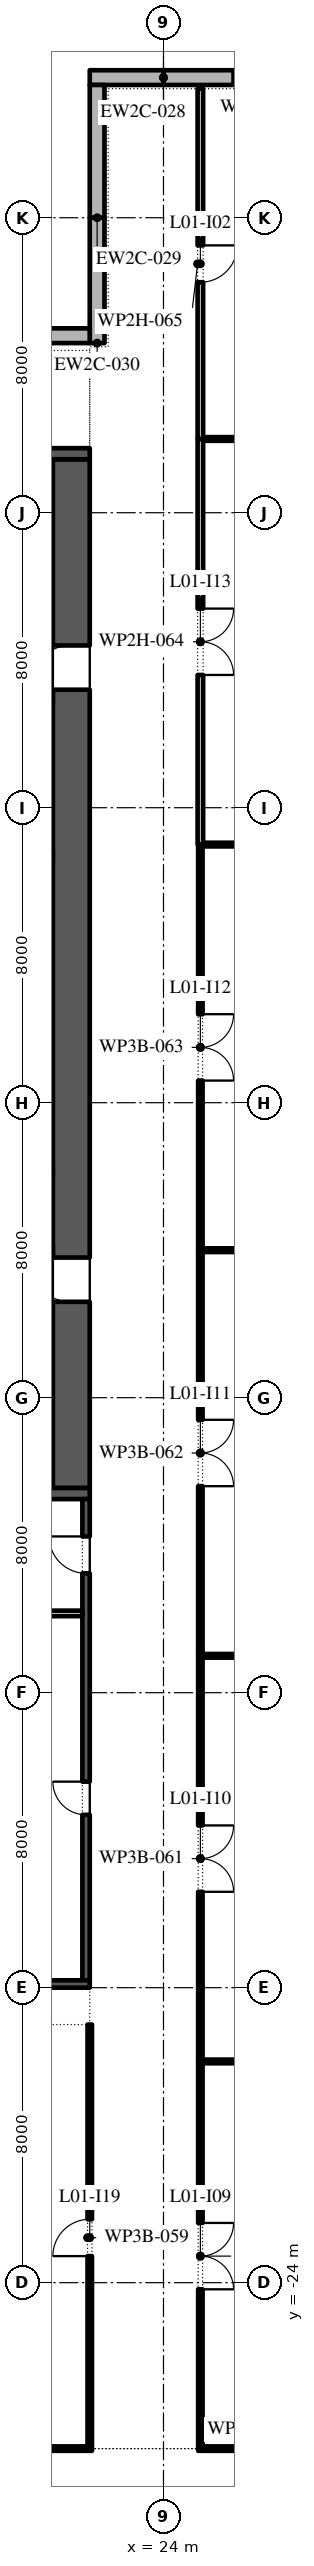
"""IFC4 building model, lengths in metres.
Left out: names, types, materials, properties, quantities, classifications, styles, units other than length and angle.
Written with IfcOpenShell. Run it as: python <this file> out.ifc"""

import sys

from ifc_helpers import new_model, si_unit, direction, frame, frame_2d, origin, place, context, subcontext, project, spatial, polyline, rectangle, outline, extrude, element, fill, save


model = new_model("IFC4")
c1 = context("Model", 3, precision=1e-05, world=origin(), true_north=direction((0.0, 1.0)))
c2 = subcontext(c1, "Body", "Model", "MODEL_VIEW")
j1 = project(units=[si_unit("LENGTHUNIT", "METRE"), si_unit("PLANEANGLEUNIT", "RADIAN")], contexts=[c1])
p1 = place(None, origin())
s1 = spatial("IfcSite", under=j1, at=p1, CompositionType="ELEMENT")
p2 = place(p1, origin())
s2 = spatial("IfcBuilding", under=s1, at=p2, CompositionType="ELEMENT")
p3 = place(p2, frame((0.0, 0.0, 8.0)))
s3 = spatial("IfcBuildingStorey", under=s2, at=p3, CompositionType="ELEMENT", Elevation=8.0)
p4 = place(p3, frame((32.0, 35.8, 0.0), z_axis=(0.0, 0.0, 1.0), x_axis=(-1.0, 0.0, 0.0)))
e1 = element("IfcWall", 1, at=p4, inside=s3, PredefinedType="STANDARD", context=c2, shape_type="SweptSolid", body=[
    extrude(rectangle(XDim=8.0, YDim=0.4, at=frame_2d((4.0, 0.0))), origin(), (0.0, 0.0, 1.0), 5.7),
])
p5 = place(p4, frame((1.9, 0.0, 0.9)))
e2 = element("IfcOpeningElement", 2, at=p5, cuts=e1, PredefinedType="OPENING", context=c2, shape_type="SweptSolid", body=[
    extrude(outline(polyline([(0.0, 0.0), (1.8, 0.0), (1.8, 2.641), (1.785, 2.876), (1.739, 3.107), (1.663, 3.33), (1.559, 3.541), (1.428, 3.737), (1.273, 3.914), (1.096, 4.069), (0.9, 4.2), (0.704, 4.069), (0.527, 3.914), (0.372, 3.737), (0.241, 3.541), (0.137, 3.33), (0.061, 3.107), (0.015, 2.876), (0.0, 2.641), (0.0, 0.0)])), frame((0.0, 0.21, 0.0), z_axis=(0.0, -1.0, 0.0), x_axis=(1.0, 0.0, 0.0)), (0.0, 0.0, 1.0), 0.42),
])
p6 = place(p4, frame((4.3, 0.0, 0.9)))
e3 = element("IfcOpeningElement", 3, at=p6, cuts=e1, PredefinedType="OPENING", context=c2, shape_type="SweptSolid", body=[
    extrude(outline(polyline([(0.0, 0.0), (1.8, 0.0), (1.8, 2.641), (1.785, 2.876), (1.739, 3.107), (1.663, 3.33), (1.559, 3.541), (1.428, 3.737), (1.273, 3.914), (1.096, 4.069), (0.9, 4.2), (0.704, 4.069), (0.527, 3.914), (0.372, 3.737), (0.241, 3.541), (0.137, 3.33), (0.061, 3.107), (0.015, 2.876), (0.0, 2.641), (0.0, 0.0)])), frame((0.0, 0.21, 0.0), z_axis=(0.0, -1.0, 0.0), x_axis=(1.0, 0.0, 0.0)), (0.0, 0.0, 1.0), 0.42),
])
p7 = place(p3, frame((24.0, 35.8, 0.0), z_axis=(0.0, 0.0, 1.0), x_axis=(-1.0, 0.0, 0.0)))
e4 = element("IfcWall", 4, at=p7, inside=s3, PredefinedType="STANDARD", context=c2, shape_type="SweptSolid", body=[
    extrude(rectangle(XDim=2.0, YDim=0.4, at=frame_2d((1.0, 0.0))), origin(), (0.0, 0.0, 1.0), 5.7),
])
p8 = place(p3, frame((22.2, 35.6, 0.0), z_axis=(0.0, 0.0, 1.0), x_axis=(0.0, -1.0, 0.0)))
e5 = element("IfcWall", 5, at=p8, inside=s3, PredefinedType="STANDARD", context=c2, shape_type="SweptSolid", body=[
    extrude(rectangle(XDim=3.6, YDim=0.4, at=frame_2d((1.8, 0.0))), origin(), (0.0, 0.0, 1.0), 5.7),
])
p9 = place(p3, frame((22.2, 32.0, 0.0), z_axis=(0.0, 0.0, 1.0), x_axis=(0.0, -1.0, 0.0)))
e6 = element("IfcWall", 6, at=p9, inside=s3, PredefinedType="STANDARD", context=c2, shape_type="SweptSolid", body=[
    extrude(rectangle(XDim=3.4, YDim=0.4, at=frame_2d((1.7, 0.0))), origin(), (0.0, 0.0, 1.0), 5.7),
])
p10 = place(p3, frame((22.0, 28.8, 0.0), z_axis=(0.0, 0.0, 1.0), x_axis=(-1.0, 0.0, 0.0)))
e7 = element("IfcWall", 7, at=p10, inside=s3, PredefinedType="STANDARD", context=c2, shape_type="SweptSolid", body=[
    extrude(rectangle(XDim=6.0, YDim=0.4, at=frame_2d((3.0, 0.0))), origin(), (0.0, 0.0, 1.0), 5.7),
])
p11 = place(p3, frame((21.5, -2.45, 0.0), z_axis=(0.0, 0.0, 1.0), x_axis=(0.0, 1.0, 0.0)))
e8 = element("IfcWall", 8, at=p11, inside=s3, PredefinedType="SHEAR", context=c2, shape_type="SweptSolid", body=[
    extrude(rectangle(XDim=27.9, YDim=1.0, at=frame_2d((13.95, 0.0))), origin(), (0.0, 0.0, 1.0), 5.7),
])
p12 = place(p11, frame((5.05, 0.0, 0.0)))
e9 = element("IfcOpeningElement", 9, at=p12, cuts=e8, PredefinedType="OPENING", context=c2, shape_type="SweptSolid", body=[
    extrude(rectangle(XDim=1.2, YDim=2.1, at=frame_2d((0.6, 1.05))), frame((0.0, 0.51, 0.0), z_axis=(0.0, -1.0, 0.0), x_axis=(1.0, 0.0, 0.0)), (0.0, 0.0, 1.0), 1.02),
])
p13 = place(p11, frame((21.65, 0.0, 0.0)))
e10 = element("IfcOpeningElement", 10, at=p13, cuts=e8, PredefinedType="OPENING", context=c2, shape_type="SweptSolid", body=[
    extrude(rectangle(XDim=1.2, YDim=2.1, at=frame_2d((0.6, 1.05))), frame((0.0, 0.51, 0.0), z_axis=(0.0, -1.0, 0.0), x_axis=(1.0, 0.0, 0.0)), (0.0, 0.0, 1.0), 1.02),
])
for number, where, z_axis, x_axis in (
    (11, (10.0, -2.6, 0.0), (0.0, 0.0, 1.0), (1.0, 0.0, 0.0)),
    (12, (10.0, 25.6, 0.0), (0.0, 0.0, 1.0), (1.0, 0.0, 0.0)),
):
    element("IfcWall", number, at=place(p3, frame(where, z_axis=z_axis, x_axis=x_axis)), inside=s3, PredefinedType="SHEAR", context=c2, shape_type="SweptSolid", body=[
        extrude(rectangle(XDim=12.0, YDim=0.3, at=frame_2d((6.0, 0.0))), origin(), (0.0, 0.0, 1.0), 5.7),
    ])
for number, where, z_axis, x_axis in (
    (13, (17.3, 4.0, 0.0), (0.0, 0.0, 1.0), (1.0, 0.0, 0.0)),
    (14, (17.3, 19.0, 0.0), (0.0, 0.0, 1.0), (1.0, 0.0, 0.0)),
):
    element("IfcWall", number, at=place(p3, frame(where, z_axis=z_axis, x_axis=x_axis)), inside=s3, PredefinedType="SHEAR", context=c2, shape_type="SweptSolid", body=[
        extrude(rectangle(XDim=3.7, YDim=0.3, at=frame_2d((1.85, 0.0))), origin(), (0.0, 0.0, 1.0), 5.7),
    ])
p14 = place(p3, frame((21.9, -15.8, 0.0), z_axis=(0.0, 0.0, 1.0), x_axis=(0.0, 1.0, 0.0)))
e15 = element("IfcWall", 15, at=p14, inside=s3, PredefinedType="SHEAR", context=c2, shape_type="SweptSolid", body=[
    extrude(rectangle(XDim=13.05, YDim=0.2, at=frame_2d((6.525, 0.0))), origin(), (0.0, 0.0, 1.0), 5.7),
])
p15 = place(p14, frame((4.488, 0.0, 0.0)))
e16 = element("IfcOpeningElement", 16, at=p15, cuts=e15, PredefinedType="OPENING", context=c2, shape_type="SweptSolid", body=[
    extrude(rectangle(XDim=0.9, YDim=2.1, at=frame_2d((0.45, 1.05))), frame((0.0, 0.11, 0.0), z_axis=(0.0, -1.0, 0.0), x_axis=(1.0, 0.0, 0.0)), (0.0, 0.0, 1.0), 0.22),
])
p16 = place(p14, frame((11.038, 0.0, 0.0)))
e17 = element("IfcOpeningElement", 17, at=p16, cuts=e15, PredefinedType="OPENING", context=c2, shape_type="SweptSolid", body=[
    extrude(rectangle(XDim=1.0, YDim=2.1, at=frame_2d((0.5, 1.05))), frame((0.0, 0.11, 0.0), z_axis=(0.0, -1.0, 0.0), x_axis=(1.0, 0.0, 0.0)), (0.0, 0.0, 1.0), 0.22),
])
p17 = place(p3, frame((10.0, -15.9, 0.0), z_axis=(0.0, 0.0, 1.0), x_axis=(1.0, 0.0, 0.0)))
e18 = element("IfcWall", 18, at=p17, inside=s3, PredefinedType="SHEAR", context=c2, shape_type="SweptSolid", body=[
    extrude(rectangle(XDim=12.0, YDim=0.2, at=frame_2d((6.0, 0.0))), origin(), (0.0, 0.0, 1.0), 5.7),
])
p18 = place(p3, frame((16.075, -5.85, 0.0), z_axis=(0.0, 0.0, 1.0), x_axis=(1.0, 0.0, 0.0)))
e19 = element("IfcWall", 19, at=p18, inside=s3, PredefinedType="PARTITIONING", context=c2, shape_type="SweptSolid", body=[
    extrude(rectangle(XDim=5.725, YDim=0.15, at=frame_2d((2.863, 0.0))), origin(), (0.0, 0.0, 1.0), 5.7),
])
p19 = place(p3, frame((10.4, -28.5, 0.0), z_axis=(0.0, 0.0, 1.0), x_axis=(1.0, 0.0, 0.0)))
e20 = element("IfcWall", 20, at=p19, inside=s3, PredefinedType="PARTITIONING", context=c2, shape_type="SweptSolid", body=[
    extrude(rectangle(XDim=11.54, YDim=0.12, at=frame_2d((5.77, 0.0))), origin(), (0.0, 0.0, 1.0), 5.7),
])
p20 = place(p3, frame((25.06, -28.5, 0.0), z_axis=(0.0, 0.0, 1.0), x_axis=(1.0, 0.0, 0.0)))
e21 = element("IfcWall", 21, at=p20, inside=s3, PredefinedType="PARTITIONING", context=c2, shape_type="SweptSolid", body=[
    extrude(rectangle(XDim=1.94, YDim=0.12, at=frame_2d((0.97, 0.0))), origin(), (0.0, 0.0, 1.0), 5.7),
])
for number, where, z_axis, x_axis in (
    (22, (25.06, -18.0, 0.0), (0.0, 0.0, 1.0), (1.0, 0.0, 0.0)),
    (23, (25.06, -7.0, 0.0), (0.0, 0.0, 1.0), (1.0, 0.0, 0.0)),
):
    element("IfcWall", number, at=place(p3, frame(where, z_axis=z_axis, x_axis=x_axis)), inside=s3, PredefinedType="PARTITIONING", context=c2, shape_type="SweptSolid", body=[
        extrude(rectangle(XDim=18.44, YDim=0.1, at=frame_2d((9.22, 0.0))), origin(), (0.0, 0.0, 1.0), 5.7),
    ])
p21 = place(p3, frame((25.06, 4.0, 0.0), z_axis=(0.0, 0.0, 1.0), x_axis=(1.0, 0.0, 0.0)))
e24 = element("IfcWall", 24, at=p21, inside=s3, PredefinedType="PARTITIONING", context=c2, shape_type="SweptSolid", body=[
    extrude(rectangle(XDim=6.64, YDim=0.1, at=frame_2d((3.32, 0.0))), origin(), (0.0, 0.0, 1.0), 5.164),
])
p22 = place(p3, frame((25.075, 15.0, 0.0), z_axis=(0.0, 0.0, 1.0), x_axis=(1.0, 0.0, 0.0)))
e25 = element("IfcWall", 25, at=p22, inside=s3, PredefinedType="PARTITIONING", context=c2, shape_type="SweptSolid", body=[
    extrude(rectangle(XDim=16.425, YDim=0.1, at=frame_2d((8.212, 0.0))), origin(), (0.0, 0.0, 1.0), 5.7),
])
p23 = place(p3, frame((25.075, 26.0, 0.0), z_axis=(0.0, 0.0, 1.0), x_axis=(1.0, 0.0, 0.0)))
e26 = element("IfcWall", 26, at=p23, inside=s3, PredefinedType="PARTITIONING", context=c2, shape_type="SweptSolid", body=[
    extrude(rectangle(XDim=8.925, YDim=0.1, at=frame_2d((4.462, 0.0))), origin(), (0.0, 0.0, 1.0), 5.7),
])
p24 = place(p3, frame((22.0, -28.56, 0.0), z_axis=(0.0, 0.0, 1.0), x_axis=(0.0, 1.0, 0.0)))
e27 = element("IfcWall", 27, at=p24, inside=s3, PredefinedType="PARTITIONING", context=c2, shape_type="SweptSolid", body=[
    extrude(rectangle(XDim=11.56, YDim=0.12, at=frame_2d((5.78, 0.0))), origin(), (0.0, 0.0, 1.0), 5.7),
])
p25 = place(p24, frame((5.28, 0.0, 0.0)))
e28 = element("IfcOpeningElement", 28, at=p25, cuts=e27, PredefinedType="OPENING", context=c2, shape_type="SweptSolid", body=[
    extrude(rectangle(XDim=1.0, YDim=2.1, at=frame_2d((0.5, 1.05))), frame((0.0, 0.07, 0.0), z_axis=(0.0, -1.0, 0.0), x_axis=(1.0, 0.0, 0.0)), (0.0, 0.0, 1.0), 0.14),
])
p26 = place(p3, frame((25.0, -28.56, 0.0), z_axis=(0.0, 0.0, 1.0), x_axis=(0.0, 1.0, 0.0)))
e29 = element("IfcWall", 29, at=p26, inside=s3, PredefinedType="PARTITIONING", context=c2, shape_type="SweptSolid", body=[
    extrude(rectangle(XDim=10.56, YDim=0.12, at=frame_2d((5.28, 0.0))), origin(), (0.0, 0.0, 1.0), 5.7),
])
p27 = place(p26, frame((4.38, 0.0, 0.0)))
e30 = element("IfcOpeningElement", 30, at=p27, cuts=e29, PredefinedType="OPENING", context=c2, shape_type="SweptSolid", body=[
    extrude(rectangle(XDim=1.8, YDim=2.1, at=frame_2d((0.9, 1.05))), frame((0.0, 0.07, 0.0), z_axis=(0.0, -1.0, 0.0), x_axis=(1.0, 0.0, 0.0)), (0.0, 0.0, 1.0), 0.14),
])
p28 = place(p3, frame((25.0, -18.0, 0.0), z_axis=(0.0, 0.0, 1.0), x_axis=(0.0, 1.0, 0.0)))
e31 = element("IfcWall", 31, at=p28, inside=s3, PredefinedType="PARTITIONING", context=c2, shape_type="SweptSolid", body=[
    extrude(rectangle(XDim=11.0, YDim=0.12, at=frame_2d((5.5, 0.0))), origin(), (0.0, 0.0, 1.0), 5.7),
])
p29 = place(p28, frame((4.6, 0.0, 0.0)))
e32 = element("IfcOpeningElement", 32, at=p29, cuts=e31, PredefinedType="OPENING", context=c2, shape_type="SweptSolid", body=[
    extrude(rectangle(XDim=1.8, YDim=2.1, at=frame_2d((0.9, 1.05))), frame((0.0, 0.07, 0.0), z_axis=(0.0, -1.0, 0.0), x_axis=(1.0, 0.0, 0.0)), (0.0, 0.0, 1.0), 0.14),
])
p30 = place(p3, frame((25.0, -7.0, 0.0), z_axis=(0.0, 0.0, 1.0), x_axis=(0.0, 1.0, 0.0)))
e33 = element("IfcWall", 33, at=p30, inside=s3, PredefinedType="PARTITIONING", context=c2, shape_type="SweptSolid", body=[
    extrude(rectangle(XDim=11.0, YDim=0.12, at=frame_2d((5.5, 0.0))), origin(), (0.0, 0.0, 1.0), 5.7),
])
p31 = place(p30, frame((4.6, 0.0, 0.0)))
e34 = element("IfcOpeningElement", 34, at=p31, cuts=e33, PredefinedType="OPENING", context=c2, shape_type="SweptSolid", body=[
    extrude(rectangle(XDim=1.8, YDim=2.1, at=frame_2d((0.9, 1.05))), frame((0.0, 0.07, 0.0), z_axis=(0.0, -1.0, 0.0), x_axis=(1.0, 0.0, 0.0)), (0.0, 0.0, 1.0), 0.14),
])
p32 = place(p3, frame((25.0, 4.0, 0.0), z_axis=(0.0, 0.0, 1.0), x_axis=(0.0, 1.0, 0.0)))
e35 = element("IfcWall", 35, at=p32, inside=s3, PredefinedType="PARTITIONING", context=c2, shape_type="SweptSolid", body=[
    extrude(rectangle(XDim=11.0, YDim=0.12, at=frame_2d((5.5, 0.0))), origin(), (0.0, 0.0, 1.0), 5.7),
])
p33 = place(p32, frame((4.6, 0.0, 0.0)))
e36 = element("IfcOpeningElement", 36, at=p33, cuts=e35, PredefinedType="OPENING", context=c2, shape_type="SweptSolid", body=[
    extrude(rectangle(XDim=1.8, YDim=2.1, at=frame_2d((0.9, 1.05))), frame((0.0, 0.07, 0.0), z_axis=(0.0, -1.0, 0.0), x_axis=(1.0, 0.0, 0.0)), (0.0, 0.0, 1.0), 0.14),
])
p34 = place(p3, frame((25.0, 15.0, 0.0), z_axis=(0.0, 0.0, 1.0), x_axis=(0.0, 1.0, 0.0)))
e37 = element("IfcWall", 37, at=p34, inside=s3, PredefinedType="PARTITIONING", context=c2, shape_type="SweptSolid", body=[
    extrude(rectangle(XDim=11.0, YDim=0.15, at=frame_2d((5.5, 0.0))), origin(), (0.0, 0.0, 1.0), 5.7),
])
p35 = place(p34, frame((4.6, 0.0, 0.0)))
e38 = element("IfcOpeningElement", 38, at=p35, cuts=e37, PredefinedType="OPENING", context=c2, shape_type="SweptSolid", body=[
    extrude(rectangle(XDim=1.8, YDim=2.1, at=frame_2d((0.9, 1.05))), frame((0.0, 0.085, 0.0), z_axis=(0.0, -1.0, 0.0), x_axis=(1.0, 0.0, 0.0)), (0.0, 0.0, 1.0), 0.17),
])
p36 = place(p3, frame((25.0, 26.0, 0.0), z_axis=(0.0, 0.0, 1.0), x_axis=(0.0, 1.0, 0.0)))
e39 = element("IfcWall", 39, at=p36, inside=s3, PredefinedType="PARTITIONING", context=c2, shape_type="SweptSolid", body=[
    extrude(rectangle(XDim=9.5, YDim=0.15, at=frame_2d((4.75, 0.0))), origin(), (0.0, 0.0, 1.0), 5.7),
])
p37 = place(p36, frame((4.25, 0.0, 0.0)))
e40 = element("IfcOpeningElement", 40, at=p37, cuts=e39, PredefinedType="OPENING", context=c2, shape_type="SweptSolid", body=[
    extrude(rectangle(XDim=1.0, YDim=2.1, at=frame_2d((0.5, 1.05))), frame((0.0, 0.085, 0.0), z_axis=(0.0, -1.0, 0.0), x_axis=(1.0, 0.0, 0.0)), (0.0, 0.0, 1.0), 0.17),
])
p38 = place(p6, origin())
e41 = element("IfcWindow", 41, at=p38, inside=s3, PartitioningType="DOUBLE_PANEL_VERTICAL", PredefinedType="WINDOW", context=c2, shape_type="SweptSolid", body=[
    extrude(outline(polyline([(0.0, 0.0), (1.8, 0.0), (1.8, 2.641), (1.785, 2.876), (1.739, 3.107), (1.663, 3.33), (1.559, 3.541), (1.428, 3.737), (1.273, 3.914), (1.096, 4.069), (0.9, 4.2), (0.704, 4.069), (0.527, 3.914), (0.372, 3.737), (0.241, 3.541), (0.137, 3.33), (0.061, 3.107), (0.015, 2.876), (0.0, 2.641), (0.0, 0.0)])), frame((0.0, 0.03, 0.0), z_axis=(0.0, -1.0, 0.0), x_axis=(1.0, 0.0, 0.0)), (0.0, 0.0, 1.0), 0.06),
])
fill(e3, e41)
p39 = place(p12, origin())
e42 = element("IfcDoor", 42, at=p39, inside=s3, OperationType="SINGLE_SWING_LEFT", PredefinedType="DOOR", context=c2, shape_type="SweptSolid", body=[
    extrude(rectangle(XDim=1.2, YDim=2.1, at=frame_2d((0.6, 1.05))), frame((0.0, 0.025, 0.0), z_axis=(0.0, -1.0, 0.0), x_axis=(1.0, 0.0, 0.0)), (0.0, 0.0, 1.0), 0.05),
])
fill(e9, e42)
p40 = place(p13, origin())
e43 = element("IfcDoor", 43, at=p40, inside=s3, OperationType="SINGLE_SWING_RIGHT", PredefinedType="DOOR", context=c2, shape_type="SweptSolid", body=[
    extrude(rectangle(XDim=1.2, YDim=2.1, at=frame_2d((0.6, 1.05))), frame((0.0, 0.025, 0.0), z_axis=(0.0, -1.0, 0.0), x_axis=(1.0, 0.0, 0.0)), (0.0, 0.0, 1.0), 0.05),
])
fill(e10, e43)
p41 = place(p15, origin())
e44 = element("IfcDoor", 44, at=p41, inside=s3, OperationType="SINGLE_SWING_LEFT", PredefinedType="DOOR", context=c2, shape_type="SweptSolid", body=[
    extrude(rectangle(XDim=0.9, YDim=2.1, at=frame_2d((0.45, 1.05))), frame((0.0, 0.1, 0.0), z_axis=(0.0, -1.0, 0.0), x_axis=(1.0, 0.0, 0.0)), (0.0, 0.0, 1.0), 0.05),
])
fill(e16, e44)
p42 = place(p16, origin())
e45 = element("IfcDoor", 45, at=p42, inside=s3, OperationType="SINGLE_SWING_LEFT", PredefinedType="DOOR", context=c2, shape_type="SweptSolid", body=[
    extrude(rectangle(XDim=1.0, YDim=2.1, at=frame_2d((0.5, 1.05))), frame((0.0, 0.1, 0.0), z_axis=(0.0, -1.0, 0.0), x_axis=(1.0, 0.0, 0.0)), (0.0, 0.0, 1.0), 0.05),
])
fill(e17, e45)
p43 = place(p37, frame((1.0, 0.0, 0.0), z_axis=(0.0, 0.0, 1.0), x_axis=(-1.0, 0.0, 0.0)))
e46 = element("IfcDoor", 46, at=p43, inside=s3, OperationType="SINGLE_SWING_RIGHT", PredefinedType="DOOR", context=c2, shape_type="SweptSolid", body=[
    extrude(rectangle(XDim=1.0, YDim=2.1, at=frame_2d((0.5, 1.05))), frame((0.0, 0.025, 0.0), z_axis=(0.0, -1.0, 0.0), x_axis=(1.0, 0.0, 0.0)), (0.0, 0.0, 1.0), 0.05),
])
fill(e40, e46)
p44 = place(p27, frame((1.8, 0.0, 0.0), z_axis=(0.0, 0.0, 1.0), x_axis=(-1.0, 0.0, 0.0)))
e47 = element("IfcDoor", 47, at=p44, inside=s3, OperationType="SINGLE_SWING_RIGHT", PredefinedType="DOOR", context=c2, shape_type="SweptSolid", body=[
    extrude(rectangle(XDim=1.8, YDim=2.1, at=frame_2d((0.9, 1.05))), frame((0.0, 0.025, 0.0), z_axis=(0.0, -1.0, 0.0), x_axis=(1.0, 0.0, 0.0)), (0.0, 0.0, 1.0), 0.05),
])
fill(e30, e47)
p45 = place(p29, frame((1.8, 0.0, 0.0), z_axis=(0.0, 0.0, 1.0), x_axis=(-1.0, 0.0, 0.0)))
e48 = element("IfcDoor", 48, at=p45, inside=s3, OperationType="SINGLE_SWING_LEFT", PredefinedType="DOOR", context=c2, shape_type="SweptSolid", body=[
    extrude(rectangle(XDim=1.8, YDim=2.1, at=frame_2d((0.9, 1.05))), frame((0.0, 0.025, 0.0), z_axis=(0.0, -1.0, 0.0), x_axis=(1.0, 0.0, 0.0)), (0.0, 0.0, 1.0), 0.05),
])
fill(e32, e48)
p46 = place(p31, frame((1.8, 0.0, 0.0), z_axis=(0.0, 0.0, 1.0), x_axis=(-1.0, 0.0, 0.0)))
e49 = element("IfcDoor", 49, at=p46, inside=s3, OperationType="SINGLE_SWING_LEFT", PredefinedType="DOOR", context=c2, shape_type="SweptSolid", body=[
    extrude(rectangle(XDim=1.8, YDim=2.1, at=frame_2d((0.9, 1.05))), frame((0.0, 0.025, 0.0), z_axis=(0.0, -1.0, 0.0), x_axis=(1.0, 0.0, 0.0)), (0.0, 0.0, 1.0), 0.05),
])
fill(e34, e49)
p47 = place(p33, frame((1.8, 0.0, 0.0), z_axis=(0.0, 0.0, 1.0), x_axis=(-1.0, 0.0, 0.0)))
e50 = element("IfcDoor", 50, at=p47, inside=s3, OperationType="SINGLE_SWING_LEFT", PredefinedType="DOOR", context=c2, shape_type="SweptSolid", body=[
    extrude(rectangle(XDim=1.8, YDim=2.1, at=frame_2d((0.9, 1.05))), frame((0.0, 0.025, 0.0), z_axis=(0.0, -1.0, 0.0), x_axis=(1.0, 0.0, 0.0)), (0.0, 0.0, 1.0), 0.05),
])
fill(e36, e50)
p48 = place(p35, frame((1.8, 0.0, 0.0), z_axis=(0.0, 0.0, 1.0), x_axis=(-1.0, 0.0, 0.0)))
e51 = element("IfcDoor", 51, at=p48, inside=s3, OperationType="SINGLE_SWING_LEFT", PredefinedType="DOOR", context=c2, shape_type="SweptSolid", body=[
    extrude(rectangle(XDim=1.8, YDim=2.1, at=frame_2d((0.9, 1.05))), frame((0.0, 0.025, 0.0), z_axis=(0.0, -1.0, 0.0), x_axis=(1.0, 0.0, 0.0)), (0.0, 0.0, 1.0), 0.05),
])
fill(e38, e51)
p49 = place(p25, origin())
e52 = element("IfcDoor", 52, at=p49, inside=s3, OperationType="SINGLE_SWING_RIGHT", PredefinedType="DOOR", context=c2, shape_type="SweptSolid", body=[
    extrude(rectangle(XDim=1.0, YDim=2.1, at=frame_2d((0.5, 1.05))), frame((0.0, 0.025, 0.0), z_axis=(0.0, -1.0, 0.0), x_axis=(1.0, 0.0, 0.0)), (0.0, 0.0, 1.0), 0.05),
])
fill(e28, e52)
save(model, sys.argv[1])
